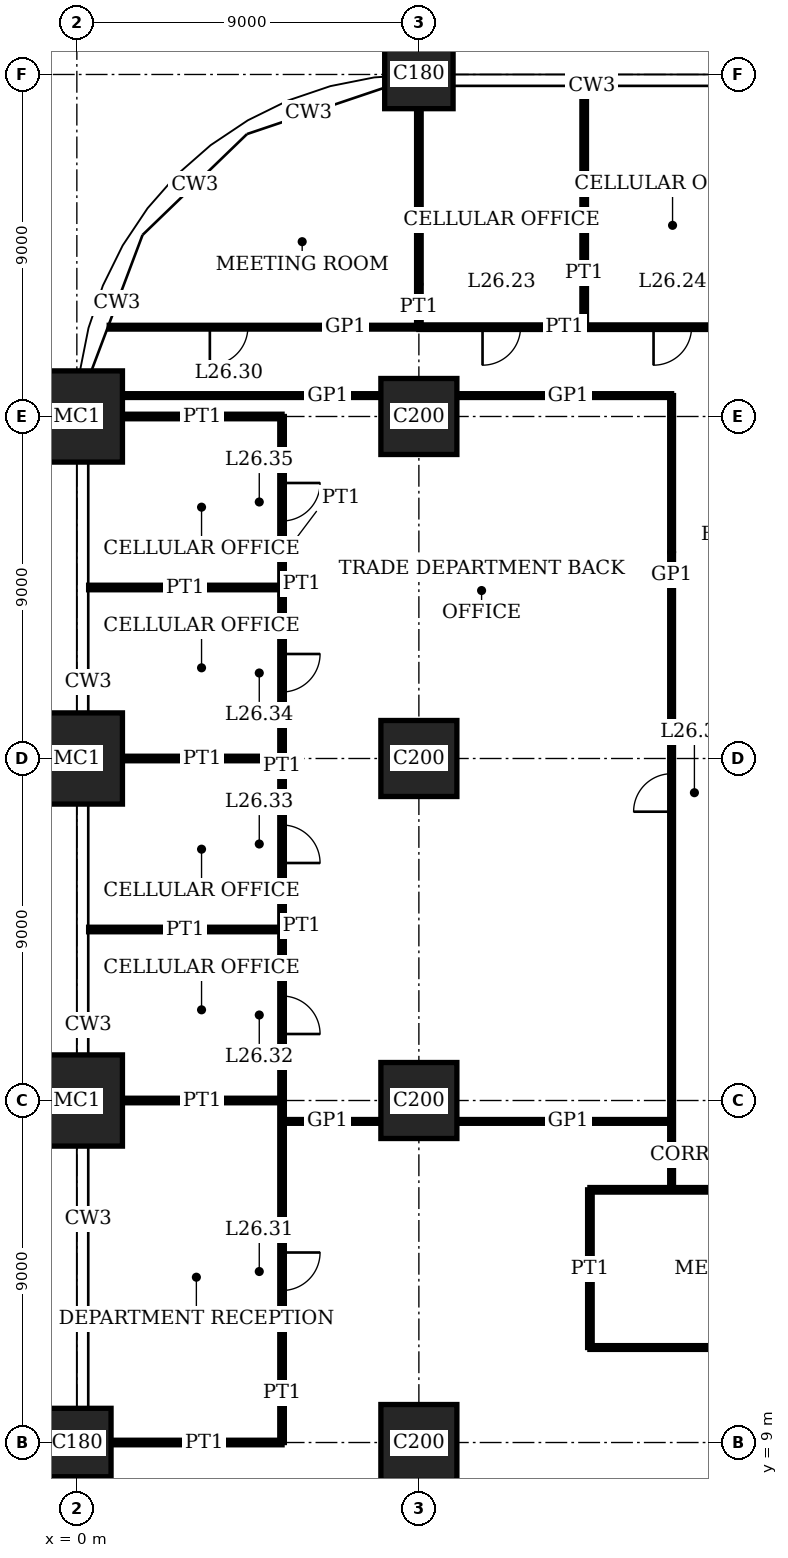
"""IFC4 building model, lengths in metres.
Left out: names, types, materials, properties, quantities, classifications, styles, units other than length and angle.
Written with IfcOpenShell. Run it as: python <this file> out.ifc"""

import sys

from ifc_helpers import new_model, si_unit, direction, frame, frame_2d, origin, origin_2d, place, context, subcontext, project, spatial, rectangle, extrude, element, fill, save


model = new_model("IFC4")
c1 = context("Model", 3, precision=1e-05, world=origin(), true_north=direction((0.0, 1.0)))
c2 = subcontext(c1, "Body", "Model", "MODEL_VIEW")
j1 = project(units=[si_unit("LENGTHUNIT", "METRE"), si_unit("PLANEANGLEUNIT", "RADIAN")], contexts=[c1])
p1 = place(None, origin())
s1 = spatial("IfcSite", under=j1, at=p1, CompositionType="ELEMENT")
p2 = place(p1, origin())
s2 = spatial("IfcBuilding", under=s1, at=p2, CompositionType="ELEMENT")
p3 = place(p2, frame((0.0, 0.0, 109.0)))
s3 = spatial("IfcBuildingStorey", under=s2, at=p3, CompositionType="ELEMENT", Elevation=109.0)
p4 = place(p3, frame((0.0, 9.0, 0.0), z_axis=(0.0, 0.0, 1.0), x_axis=(1.0, 0.0, 0.0)))
e1 = element("IfcColumn", 1, at=p4, inside=s3, PredefinedType="COLUMN", context=c2, shape_type="SweptSolid", body=[
    extrude(rectangle(XDim=1.8, YDim=1.8, at=origin_2d()), origin(), (0.0, 0.0, 1.0), 4.0),
])
for number, where, z_axis, x_axis in (
    (2, (0.0, 18.0, 0.0), (0.0, 0.0, 1.0), (1.0, 0.0, 0.0)),
    (3, (0.0, 27.0, 0.0), (0.0, 0.0, 1.0), (1.0, 0.0, 0.0)),
    (4, (0.0, 36.0, 0.0), (0.0, 0.0, 1.0), (1.0, 0.0, 0.0)),
):
    element("IfcColumn", number, at=place(p3, frame(where, z_axis=z_axis, x_axis=x_axis)), inside=s3, PredefinedType="COLUMN", context=c2, shape_type="SweptSolid", body=[
        extrude(rectangle(XDim=2.4, YDim=2.4, at=origin_2d()), origin(), (0.0, 0.0, 1.0), 4.0),
    ])
for number, where, z_axis, x_axis in (
    (5, (9.0, 9.0, 0.0), (0.0, 0.0, 1.0), (1.0, 0.0, 0.0)),
    (6, (9.0, 18.0, 0.0), (0.0, 0.0, 1.0), (1.0, 0.0, 0.0)),
    (7, (9.0, 27.0, 0.0), (0.0, 0.0, 1.0), (1.0, 0.0, 0.0)),
    (8, (9.0, 36.0, 0.0), (0.0, 0.0, 1.0), (1.0, 0.0, 0.0)),
):
    element("IfcColumn", number, at=place(p3, frame(where, z_axis=z_axis, x_axis=x_axis)), inside=s3, PredefinedType="COLUMN", context=c2, shape_type="SweptSolid", body=[
        extrude(rectangle(XDim=2.0, YDim=2.0, at=origin_2d()), origin(), (0.0, 0.0, 1.0), 4.0),
    ])
p5 = place(p3, frame((9.0, 45.0, 0.0), z_axis=(0.0, 0.0, 1.0), x_axis=(1.0, 0.0, 0.0)))
e9 = element("IfcColumn", 9, at=p5, inside=s3, PredefinedType="COLUMN", context=c2, shape_type="SweptSolid", body=[
    extrude(rectangle(XDim=1.8, YDim=1.8, at=origin_2d()), origin(), (0.0, 0.0, 1.0), 4.0),
])
p6 = place(p3, frame((0.9, 9.0, 0.0), z_axis=(0.0, 0.0, 1.0), x_axis=(1.0, 0.0, 0.0)))
e10 = element("IfcWall", 10, at=p6, inside=s3, PredefinedType="PARTITIONING", context=c2, shape_type="SweptSolid", body=[
    extrude(rectangle(XDim=4.5, YDim=0.12, at=frame_2d((2.25, 0.0))), origin(), (0.0, 0.0, 1.0), 3.05),
])
p7 = place(p3, frame((13.5, 11.5, 0.0), z_axis=(0.0, 0.0, 1.0), x_axis=(1.0, 0.0, 0.0)))
e11 = element("IfcWall", 11, at=p7, inside=s3, PredefinedType="PARTITIONING", context=c2, shape_type="SweptSolid", body=[
    extrude(rectangle(XDim=9.0, YDim=0.1, at=frame_2d((4.5, 0.0))), origin(), (0.0, 0.0, 1.0), 3.75),
])
p8 = place(p7, frame((4.0, 0.0, 0.0)))
e12 = element("IfcOpeningElement", 12, at=p8, cuts=e11, PredefinedType="OPENING", context=c2, shape_type="SweptSolid", body=[
    extrude(rectangle(XDim=1.0, YDim=2.4, at=frame_2d((0.5, 1.2))), frame((0.0, 0.06, 0.0), z_axis=(0.0, -1.0, 0.0), x_axis=(1.0, 0.0, 0.0)), (0.0, 0.0, 1.0), 0.12),
])
p9 = place(p3, frame((13.5, 15.65, 0.0), z_axis=(0.0, 0.0, 1.0), x_axis=(1.0, 0.0, 0.0)))
e13 = element("IfcWall", 13, at=p9, inside=s3, PredefinedType="PARTITIONING", context=c2, shape_type="SweptSolid", body=[
    extrude(rectangle(XDim=9.0, YDim=0.12, at=frame_2d((4.5, 0.0))), origin(), (0.0, 0.0, 1.0), 3.75),
])
p10 = place(p3, frame((5.39, 17.45, 0.0), z_axis=(0.0, 0.0, 1.0), x_axis=(1.0, 0.0, 0.0)))
e14 = element("IfcWall", 14, at=p10, inside=s3, PredefinedType="PARTITIONING", context=c2, shape_type="SweptSolid", body=[
    extrude(rectangle(XDim=2.61, YDim=0.1, at=frame_2d((1.305, 0.0))), origin(), (0.0, 0.0, 1.0), 3.75),
])
p11 = place(p3, frame((10.0, 17.45, 0.0), z_axis=(0.0, 0.0, 1.0), x_axis=(1.0, 0.0, 0.0)))
e15 = element("IfcWall", 15, at=p11, inside=s3, PredefinedType="PARTITIONING", context=c2, shape_type="SweptSolid", body=[
    extrude(rectangle(XDim=5.65, YDim=0.1, at=frame_2d((2.825, 0.0))), origin(), (0.0, 0.0, 1.0), 3.75),
])
p12 = place(p3, frame((1.2, 18.0, 0.0), z_axis=(0.0, 0.0, 1.0), x_axis=(1.0, 0.0, 0.0)))
e16 = element("IfcWall", 16, at=p12, inside=s3, PredefinedType="PARTITIONING", context=c2, shape_type="SweptSolid", body=[
    extrude(rectangle(XDim=4.2, YDim=0.12, at=frame_2d((2.1, 0.0))), origin(), (0.0, 0.0, 1.0), 3.05),
])
p13 = place(p3, frame((0.31, 22.5, 0.0), z_axis=(0.0, 0.0, 1.0), x_axis=(1.0, 0.0, 0.0)))
e17 = element("IfcWall", 17, at=p13, inside=s3, PredefinedType="PARTITIONING", context=c2, shape_type="SweptSolid", body=[
    extrude(rectangle(XDim=5.09, YDim=0.12, at=frame_2d((2.545, 0.0))), origin(), (0.0, 0.0, 1.0), 3.1),
])
p14 = place(p3, frame((1.2, 27.0, 0.0), z_axis=(0.0, 0.0, 1.0), x_axis=(1.0, 0.0, 0.0)))
e18 = element("IfcWall", 18, at=p14, inside=s3, PredefinedType="PARTITIONING", context=c2, shape_type="SweptSolid", body=[
    extrude(rectangle(XDim=4.2, YDim=0.12, at=frame_2d((2.1, 0.0))), origin(), (0.0, 0.0, 1.0), 3.05),
])
p15 = place(p3, frame((0.31, 31.5, 0.0), z_axis=(0.0, 0.0, 1.0), x_axis=(1.0, 0.0, 0.0)))
e19 = element("IfcWall", 19, at=p15, inside=s3, PredefinedType="PARTITIONING", context=c2, shape_type="SweptSolid", body=[
    extrude(rectangle(XDim=5.09, YDim=0.12, at=frame_2d((2.545, 0.0))), origin(), (0.0, 0.0, 1.0), 3.1),
])
p16 = place(p3, frame((1.2, 36.0, 0.0), z_axis=(0.0, 0.0, 1.0), x_axis=(1.0, 0.0, 0.0)))
e20 = element("IfcWall", 20, at=p16, inside=s3, PredefinedType="PARTITIONING", context=c2, shape_type="SweptSolid", body=[
    extrude(rectangle(XDim=4.2, YDim=0.12, at=frame_2d((2.1, 0.0))), origin(), (0.0, 0.0, 1.0), 3.05),
])
p17 = place(p3, frame((1.2, 36.55, 0.0), z_axis=(0.0, 0.0, 1.0), x_axis=(1.0, 0.0, 0.0)))
e21 = element("IfcWall", 21, at=p17, inside=s3, PredefinedType="PARTITIONING", context=c2, shape_type="SweptSolid", body=[
    extrude(rectangle(XDim=6.8, YDim=0.1, at=frame_2d((3.4, 0.0))), origin(), (0.0, 0.0, 1.0), 3.75),
])
p18 = place(p3, frame((10.0, 36.55, 0.0), z_axis=(0.0, 0.0, 1.0), x_axis=(1.0, 0.0, 0.0)))
e22 = element("IfcWall", 22, at=p18, inside=s3, PredefinedType="PARTITIONING", context=c2, shape_type="SweptSolid", body=[
    extrude(rectangle(XDim=5.65, YDim=0.1, at=frame_2d((2.825, 0.0))), origin(), (0.0, 0.0, 1.0), 3.75),
])
p19 = place(p3, frame((9.0, 38.35, 0.0), z_axis=(0.0, 0.0, 1.0), x_axis=(1.0, 0.0, 0.0)))
e23 = element("IfcWall", 23, at=p19, inside=s3, PredefinedType="PARTITIONING", context=c2, shape_type="SweptSolid", body=[
    extrude(rectangle(XDim=4.35, YDim=0.12, at=frame_2d((2.175, 0.0))), origin(), (0.0, 0.0, 1.0), 3.75),
])
p20 = place(p19, frame((1.675, 0.0, 0.0)))
e24 = element("IfcOpeningElement", 24, at=p20, cuts=e23, PredefinedType="OPENING", context=c2, shape_type="SweptSolid", body=[
    extrude(rectangle(XDim=1.0, YDim=2.4, at=frame_2d((0.5, 1.2))), frame((0.0, 0.07, 0.0), z_axis=(0.0, -1.0, 0.0), x_axis=(1.0, 0.0, 0.0)), (0.0, 0.0, 1.0), 0.14),
])
p21 = place(p3, frame((13.35, 38.35, 0.0), z_axis=(0.0, 0.0, 1.0), x_axis=(1.0, 0.0, 0.0)))
e25 = element("IfcWall", 25, at=p21, inside=s3, PredefinedType="PARTITIONING", context=c2, shape_type="SweptSolid", body=[
    extrude(rectangle(XDim=4.65, YDim=0.12, at=frame_2d((2.325, 0.0))), origin(), (0.0, 0.0, 1.0), 3.75),
])
p22 = place(p21, frame((1.825, 0.0, 0.0)))
e26 = element("IfcOpeningElement", 26, at=p22, cuts=e25, PredefinedType="OPENING", context=c2, shape_type="SweptSolid", body=[
    extrude(rectangle(XDim=1.0, YDim=2.4, at=frame_2d((0.5, 1.2))), frame((0.0, 0.07, 0.0), z_axis=(0.0, -1.0, 0.0), x_axis=(1.0, 0.0, 0.0)), (0.0, 0.0, 1.0), 0.14),
])
p23 = place(p3, frame((0.852, 38.35, 0.0), z_axis=(0.0, 0.0, 1.0), x_axis=(1.0, 0.0, 0.0)))
e27 = element("IfcWall", 27, at=p23, inside=s3, PredefinedType="PARTITIONING", context=c2, shape_type="SweptSolid", body=[
    extrude(rectangle(XDim=8.148, YDim=0.1, at=frame_2d((4.074, 0.0))), origin(), (0.0, 0.0, 1.0), 3.75),
])
p24 = place(p23, frame((2.648, 0.0, 0.0)))
e28 = element("IfcOpeningElement", 28, at=p24, cuts=e27, PredefinedType="OPENING", context=c2, shape_type="SweptSolid", body=[
    extrude(rectangle(XDim=1.0, YDim=2.4, at=frame_2d((0.5, 1.2))), frame((0.0, 0.06, 0.0), z_axis=(0.0, -1.0, 0.0), x_axis=(1.0, 0.0, 0.0)), (0.0, 0.0, 1.0), 0.12),
])
p25 = place(p3, frame((5.4, 9.0, 0.0), z_axis=(0.0, 0.0, 1.0), x_axis=(0.0, 1.0, 0.0)))
e29 = element("IfcWall", 29, at=p25, inside=s3, PredefinedType="PARTITIONING", context=c2, shape_type="SweptSolid", body=[
    extrude(rectangle(XDim=9.0, YDim=0.12, at=frame_2d((4.5, 0.0))), origin(), (0.0, 0.0, 1.0), 3.75),
])
p26 = place(p25, frame((4.0, 0.0, 0.0)))
e30 = element("IfcOpeningElement", 30, at=p26, cuts=e29, PredefinedType="OPENING", context=c2, shape_type="SweptSolid", body=[
    extrude(rectangle(XDim=1.0, YDim=2.4, at=frame_2d((0.5, 1.2))), frame((0.0, 0.07, 0.0), z_axis=(0.0, -1.0, 0.0), x_axis=(1.0, 0.0, 0.0)), (0.0, 0.0, 1.0), 0.14),
])
p27 = place(p3, frame((5.4, 18.0, 0.0), z_axis=(0.0, 0.0, 1.0), x_axis=(0.0, 1.0, 0.0)))
e31 = element("IfcWall", 31, at=p27, inside=s3, PredefinedType="PARTITIONING", context=c2, shape_type="SweptSolid", body=[
    extrude(rectangle(XDim=4.5, YDim=0.12, at=frame_2d((2.25, 0.0))), origin(), (0.0, 0.0, 1.0), 3.75),
])
p28 = place(p27, frame((1.75, 0.0, 0.0)))
e32 = element("IfcOpeningElement", 32, at=p28, cuts=e31, PredefinedType="OPENING", context=c2, shape_type="SweptSolid", body=[
    extrude(rectangle(XDim=1.0, YDim=2.4, at=frame_2d((0.5, 1.2))), frame((0.0, 0.07, 0.0), z_axis=(0.0, -1.0, 0.0), x_axis=(1.0, 0.0, 0.0)), (0.0, 0.0, 1.0), 0.14),
])
p29 = place(p3, frame((5.4, 22.5, 0.0), z_axis=(0.0, 0.0, 1.0), x_axis=(0.0, 1.0, 0.0)))
e33 = element("IfcWall", 33, at=p29, inside=s3, PredefinedType="PARTITIONING", context=c2, shape_type="SweptSolid", body=[
    extrude(rectangle(XDim=4.5, YDim=0.12, at=frame_2d((2.25, 0.0))), origin(), (0.0, 0.0, 1.0), 3.75),
])
p30 = place(p29, frame((1.75, 0.0, 0.0)))
e34 = element("IfcOpeningElement", 34, at=p30, cuts=e33, PredefinedType="OPENING", context=c2, shape_type="SweptSolid", body=[
    extrude(rectangle(XDim=1.0, YDim=2.4, at=frame_2d((0.5, 1.2))), frame((0.0, 0.07, 0.0), z_axis=(0.0, -1.0, 0.0), x_axis=(1.0, 0.0, 0.0)), (0.0, 0.0, 1.0), 0.14),
])
p31 = place(p3, frame((5.4, 27.0, 0.0), z_axis=(0.0, 0.0, 1.0), x_axis=(0.0, 1.0, 0.0)))
e35 = element("IfcWall", 35, at=p31, inside=s3, PredefinedType="PARTITIONING", context=c2, shape_type="SweptSolid", body=[
    extrude(rectangle(XDim=4.5, YDim=0.12, at=frame_2d((2.25, 0.0))), origin(), (0.0, 0.0, 1.0), 3.75),
])
p32 = place(p31, frame((1.75, 0.0, 0.0)))
e36 = element("IfcOpeningElement", 36, at=p32, cuts=e35, PredefinedType="OPENING", context=c2, shape_type="SweptSolid", body=[
    extrude(rectangle(XDim=1.0, YDim=2.4, at=frame_2d((0.5, 1.2))), frame((0.0, 0.07, 0.0), z_axis=(0.0, -1.0, 0.0), x_axis=(1.0, 0.0, 0.0)), (0.0, 0.0, 1.0), 0.14),
])
p33 = place(p3, frame((5.4, 31.5, 0.0), z_axis=(0.0, 0.0, 1.0), x_axis=(0.0, 1.0, 0.0)))
e37 = element("IfcWall", 37, at=p33, inside=s3, PredefinedType="PARTITIONING", context=c2, shape_type="SweptSolid", body=[
    extrude(rectangle(XDim=4.5, YDim=0.12, at=frame_2d((2.25, 0.0))), origin(), (0.0, 0.0, 1.0), 3.75),
])
p34 = place(p33, frame((1.75, 0.0, 0.0)))
e38 = element("IfcOpeningElement", 38, at=p34, cuts=e37, PredefinedType="OPENING", context=c2, shape_type="SweptSolid", body=[
    extrude(rectangle(XDim=1.0, YDim=2.4, at=frame_2d((0.5, 1.2))), frame((0.0, 0.07, 0.0), z_axis=(0.0, -1.0, 0.0), x_axis=(1.0, 0.0, 0.0)), (0.0, 0.0, 1.0), 0.14),
])
p35 = place(p3, frame((9.0, 38.35, 0.0), z_axis=(0.0, 0.0, 1.0), x_axis=(0.0, 1.0, 0.0)))
e39 = element("IfcWall", 39, at=p35, inside=s3, PredefinedType="PARTITIONING", context=c2, shape_type="SweptSolid", body=[
    extrude(rectangle(XDim=5.75, YDim=0.12, at=frame_2d((2.875, 0.0))), origin(), (0.0, 0.0, 1.0), 3.05),
])
p36 = place(p3, frame((13.35, 38.35, 0.0), z_axis=(0.0, 0.0, 1.0), x_axis=(0.0, 1.0, 0.0)))
e40 = element("IfcWall", 40, at=p36, inside=s3, PredefinedType="PARTITIONING", context=c2, shape_type="SweptSolid", body=[
    extrude(rectangle(XDim=6.34, YDim=0.12, at=frame_2d((3.17, 0.0))), origin(), (0.0, 0.0, 1.0), 3.75),
])
p37 = place(p3, frame((13.5, 11.5, 0.0), z_axis=(0.0, 0.0, 1.0), x_axis=(0.0, 1.0, 0.0)))
e41 = element("IfcWall", 41, at=p37, inside=s3, PredefinedType="PARTITIONING", context=c2, shape_type="SweptSolid", body=[
    extrude(rectangle(XDim=4.15, YDim=0.12, at=frame_2d((2.075, 0.0))), origin(), (0.0, 0.0, 1.0), 3.75),
])
p38 = place(p3, frame((15.65, 15.65, 0.0), z_axis=(0.0, 0.0, 1.0), x_axis=(0.0, 1.0, 0.0)))
e42 = element("IfcWall", 42, at=p38, inside=s3, PredefinedType="PARTITIONING", context=c2, shape_type="SweptSolid", body=[
    extrude(rectangle(XDim=20.9, YDim=0.1, at=frame_2d((10.45, 0.0))), origin(), (0.0, 0.0, 1.0), 3.75),
])
p39 = place(p38, frame((9.95, 0.0, 0.0)))
e43 = element("IfcOpeningElement", 43, at=p39, cuts=e42, PredefinedType="OPENING", context=c2, shape_type="SweptSolid", body=[
    extrude(rectangle(XDim=1.0, YDim=2.4, at=frame_2d((0.5, 1.2))), frame((0.0, 0.06, 0.0), z_axis=(0.0, -1.0, 0.0), x_axis=(1.0, 0.0, 0.0)), (0.0, 0.0, 1.0), 0.12),
])
p40 = place(p20, origin())
e44 = element("IfcDoor", 44, at=p40, inside=s3, OperationType="SINGLE_SWING_LEFT", PredefinedType="DOOR", context=c2, shape_type="SweptSolid", body=[
    extrude(rectangle(XDim=1.0, YDim=2.4, at=frame_2d((0.5, 1.2))), frame((0.0, 0.025, 0.0), z_axis=(0.0, -1.0, 0.0), x_axis=(1.0, 0.0, 0.0)), (0.0, 0.0, 1.0), 0.05),
])
fill(e24, e44)
p41 = place(p22, origin())
e45 = element("IfcDoor", 45, at=p41, inside=s3, OperationType="SINGLE_SWING_LEFT", PredefinedType="DOOR", context=c2, shape_type="SweptSolid", body=[
    extrude(rectangle(XDim=1.0, YDim=2.4, at=frame_2d((0.5, 1.2))), frame((0.0, 0.025, 0.0), z_axis=(0.0, -1.0, 0.0), x_axis=(1.0, 0.0, 0.0)), (0.0, 0.0, 1.0), 0.05),
])
fill(e26, e45)
p42 = place(p24, origin())
e46 = element("IfcDoor", 46, at=p42, inside=s3, OperationType="SINGLE_SWING_LEFT", PredefinedType="DOOR", context=c2, shape_type="SweptSolid", body=[
    extrude(rectangle(XDim=1.0, YDim=2.4, at=frame_2d((0.5, 1.2))), frame((0.0, 0.02, 0.0), z_axis=(0.0, -1.0, 0.0), x_axis=(1.0, 0.0, 0.0)), (0.0, 0.0, 1.0), 0.04),
])
fill(e28, e46)
p43 = place(p26, origin())
e47 = element("IfcDoor", 47, at=p43, inside=s3, OperationType="SINGLE_SWING_RIGHT", PredefinedType="DOOR", context=c2, shape_type="SweptSolid", body=[
    extrude(rectangle(XDim=1.0, YDim=2.4, at=frame_2d((0.5, 1.2))), frame((0.0, 0.025, 0.0), z_axis=(0.0, -1.0, 0.0), x_axis=(1.0, 0.0, 0.0)), (0.0, 0.0, 1.0), 0.05),
])
fill(e30, e47)
p44 = place(p28, origin())
e48 = element("IfcDoor", 48, at=p44, inside=s3, OperationType="SINGLE_SWING_LEFT", PredefinedType="DOOR", context=c2, shape_type="SweptSolid", body=[
    extrude(rectangle(XDim=1.0, YDim=2.4, at=frame_2d((0.5, 1.2))), frame((0.0, 0.025, 0.0), z_axis=(0.0, -1.0, 0.0), x_axis=(1.0, 0.0, 0.0)), (0.0, 0.0, 1.0), 0.05),
])
fill(e32, e48)
p45 = place(p30, origin())
e49 = element("IfcDoor", 49, at=p45, inside=s3, OperationType="SINGLE_SWING_LEFT", PredefinedType="DOOR", context=c2, shape_type="SweptSolid", body=[
    extrude(rectangle(XDim=1.0, YDim=2.4, at=frame_2d((0.5, 1.2))), frame((0.0, 0.025, 0.0), z_axis=(0.0, -1.0, 0.0), x_axis=(1.0, 0.0, 0.0)), (0.0, 0.0, 1.0), 0.05),
])
fill(e34, e49)
p46 = place(p32, origin())
e50 = element("IfcDoor", 50, at=p46, inside=s3, OperationType="SINGLE_SWING_RIGHT", PredefinedType="DOOR", context=c2, shape_type="SweptSolid", body=[
    extrude(rectangle(XDim=1.0, YDim=2.4, at=frame_2d((0.5, 1.2))), frame((0.0, 0.025, 0.0), z_axis=(0.0, -1.0, 0.0), x_axis=(1.0, 0.0, 0.0)), (0.0, 0.0, 1.0), 0.05),
])
fill(e36, e50)
p47 = place(p34, origin())
e51 = element("IfcDoor", 51, at=p47, inside=s3, OperationType="SINGLE_SWING_RIGHT", PredefinedType="DOOR", context=c2, shape_type="SweptSolid", body=[
    extrude(rectangle(XDim=1.0, YDim=2.4, at=frame_2d((0.5, 1.2))), frame((0.0, 0.025, 0.0), z_axis=(0.0, -1.0, 0.0), x_axis=(1.0, 0.0, 0.0)), (0.0, 0.0, 1.0), 0.05),
])
fill(e38, e51)
p48 = place(p39, origin())
e52 = element("IfcDoor", 52, at=p48, inside=s3, OperationType="SINGLE_SWING_RIGHT", PredefinedType="DOOR", context=c2, shape_type="SweptSolid", body=[
    extrude(rectangle(XDim=1.0, YDim=2.4, at=frame_2d((0.5, 1.2))), frame((0.0, 0.02, 0.0), z_axis=(0.0, -1.0, 0.0), x_axis=(1.0, 0.0, 0.0)), (0.0, 0.0, 1.0), 0.04),
])
fill(e43, e52)
save(model, sys.argv[1])
